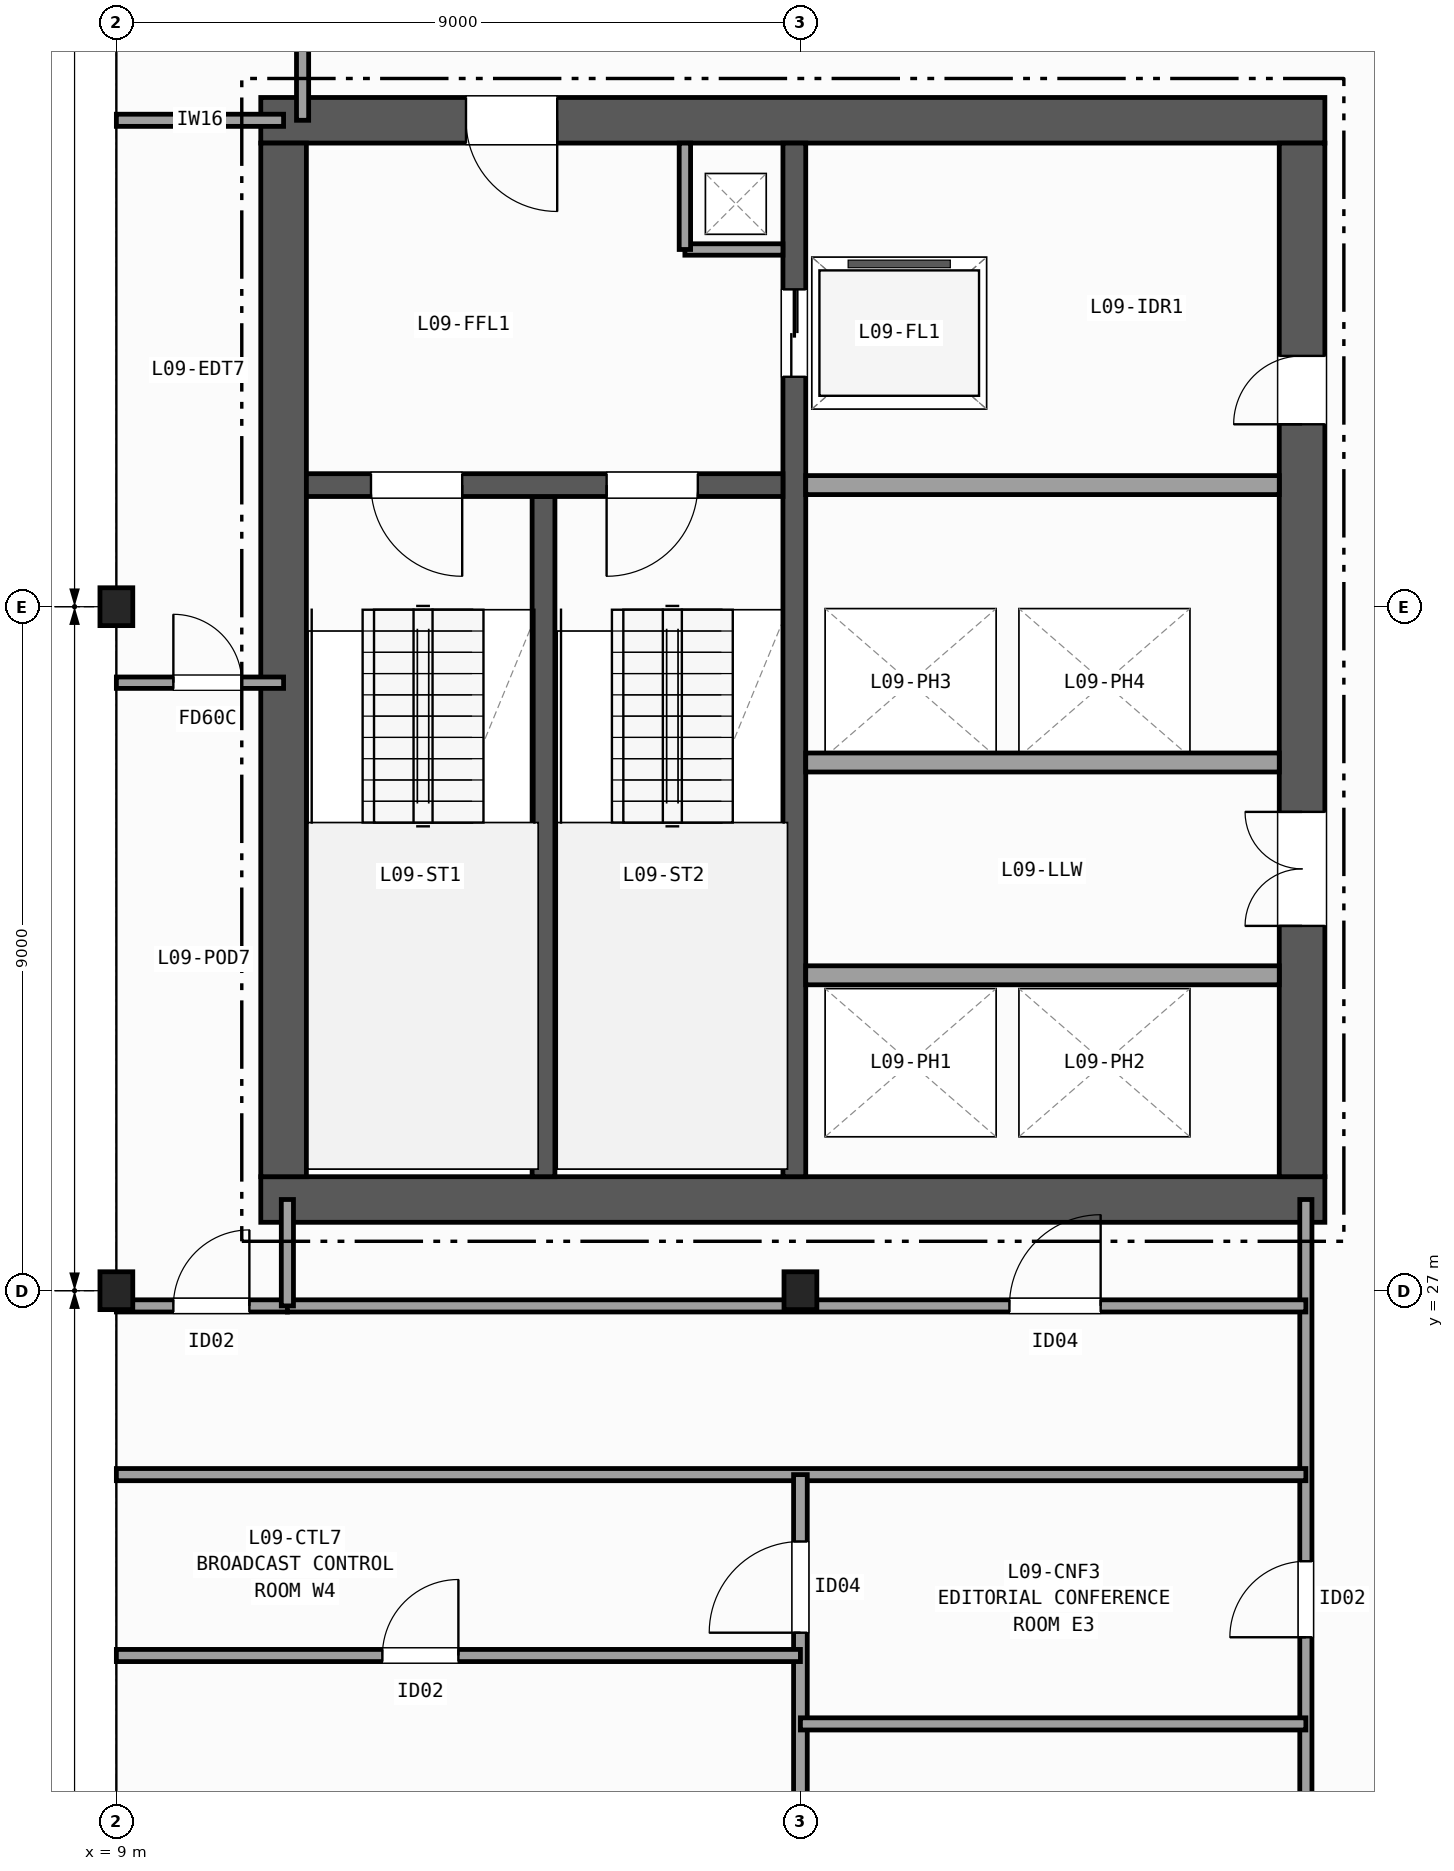
"""IFC4 building model, lengths in metres.
Left out: names, types, materials, properties, quantities, classifications, styles, units other than length and angle.
Written with IfcOpenShell. Run it as: python <this file> out.ifc"""

import sys

from ifc_helpers import new_model, si_unit, direction, frame, frame_2d, origin, origin_2d, place, context, subcontext, project, spatial, rectangle, i_section, extrude, element, fill, save


model = new_model("IFC4")
c1 = context("Model", 3, precision=1e-05, world=origin(), true_north=direction((0.0, 1.0)))
c2 = subcontext(c1, "Body", "Model", "MODEL_VIEW")
j1 = project(units=[si_unit("LENGTHUNIT", "METRE"), si_unit("PLANEANGLEUNIT", "RADIAN")], contexts=[c1])
p1 = place(None, origin())
s1 = spatial("IfcSite", under=j1, at=p1, CompositionType="ELEMENT")
p2 = place(p1, origin())
s2 = spatial("IfcBuilding", under=s1, at=p2, CompositionType="ELEMENT")
p3 = place(p2, frame((0.0, 0.0, 43.4)))
s3 = spatial("IfcBuildingStorey", under=s2, at=p3, CompositionType="ELEMENT", Elevation=43.4)
for number, where, z_axis, x_axis in (
    (1, (9.0, 27.0, 0.0), (0.0, 0.0, 1.0), (1.0, 0.0, 0.0)),
    (2, (9.0, 36.0, 0.0), (0.0, 0.0, 1.0), (1.0, 0.0, 0.0)),
    (3, (18.0, 27.0, 0.0), (0.0, 0.0, 1.0), (1.0, 0.0, 0.0)),
):
    element("IfcColumn", number, at=place(p3, frame(where, z_axis=z_axis, x_axis=x_axis)), inside=s3, PredefinedType="COLUMN", context=c2, shape_type="SweptSolid", body=[
        extrude(i_section(OverallWidth=0.432, OverallDepth=0.498, WebThickness=0.056, FlangeThickness=0.089, FilletRadius=0.015, at=origin_2d()), origin(), (0.0, 0.0, 1.0), 3.7),
    ])
p4 = place(p3, frame((10.9, 28.2, 0.0), z_axis=(0.0, 0.0, 1.0), x_axis=(1.0, 0.0, 0.0)))
e4 = element("IfcWall", 4, at=p4, inside=s3, PredefinedType="SHEAR", context=c2, shape_type="SweptSolid", body=[
    extrude(rectangle(XDim=14.0, YDim=0.6, at=frame_2d((7.0, 0.0))), origin(), (0.0, 0.0, 1.0), 3.42),
])
p5 = place(p3, frame((24.9, 42.4, 0.0), z_axis=(0.0, 0.0, 1.0), x_axis=(-1.0, 0.0, 0.0)))
e5 = element("IfcWall", 5, at=p5, inside=s3, PredefinedType="SHEAR", context=c2, shape_type="SweptSolid", body=[
    extrude(rectangle(XDim=14.0, YDim=0.6, at=frame_2d((7.0, 0.0))), origin(), (0.0, 0.0, 1.0), 3.42),
])
p6 = place(p5, frame((10.1, 0.0, 0.0)))
e6 = element("IfcOpeningElement", 6, at=p6, cuts=e5, PredefinedType="OPENING", context=c2, shape_type="SweptSolid", body=[
    extrude(rectangle(XDim=1.2, YDim=2.15, at=frame_2d((0.6, 1.075))), frame((0.0, 0.31, 0.0), z_axis=(0.0, -1.0, 0.0), x_axis=(1.0, 0.0, 0.0)), (0.0, 0.0, 1.0), 0.62),
])
p7 = place(p3, frame((11.2, 42.1, 0.0), z_axis=(0.0, 0.0, 1.0), x_axis=(0.0, -1.0, 0.0)))
e7 = element("IfcWall", 7, at=p7, inside=s3, PredefinedType="SHEAR", context=c2, shape_type="SweptSolid", body=[
    extrude(rectangle(XDim=13.6, YDim=0.6, at=frame_2d((6.8, 0.0))), origin(), (0.0, 0.0, 1.0), 3.42),
])
p8 = place(p3, frame((24.6, 28.5, 0.0), z_axis=(0.0, 0.0, 1.0), x_axis=(0.0, 1.0, 0.0)))
e8 = element("IfcWall", 8, at=p8, inside=s3, PredefinedType="SHEAR", context=c2, shape_type="SweptSolid", body=[
    extrude(rectangle(XDim=13.6, YDim=0.6, at=frame_2d((6.8, 0.0))), origin(), (0.0, 0.0, 1.0), 3.42),
])
p9 = place(p8, frame((3.3, 0.0, 0.0)))
e9 = element("IfcOpeningElement", 9, at=p9, cuts=e8, PredefinedType="OPENING", context=c2, shape_type="SweptSolid", body=[
    extrude(rectangle(XDim=1.5, YDim=2.2, at=frame_2d((0.75, 1.1))), frame((0.0, 0.31, 0.0), z_axis=(0.0, -1.0, 0.0), x_axis=(1.0, 0.0, 0.0)), (0.0, 0.0, 1.0), 0.62),
])
p10 = place(p8, frame((9.9, 0.0, 0.0)))
e10 = element("IfcOpeningElement", 10, at=p10, cuts=e8, PredefinedType="OPENING", context=c2, shape_type="SweptSolid", body=[
    extrude(rectangle(XDim=0.9, YDim=2.1, at=frame_2d((0.45, 1.05))), frame((0.0, 0.31, 0.0), z_axis=(0.0, -1.0, 0.0), x_axis=(1.0, 0.0, 0.0)), (0.0, 0.0, 1.0), 0.62),
])
p11 = place(p3, frame((14.62, 28.5, 0.0), z_axis=(0.0, 0.0, 1.0), x_axis=(0.0, 1.0, 0.0)))
e11 = element("IfcWall", 11, at=p11, inside=s3, PredefinedType="SHEAR", context=c2, shape_type="SweptSolid", body=[
    extrude(rectangle(XDim=8.95, YDim=0.3, at=frame_2d((4.475, 0.0))), origin(), (0.0, 0.0, 1.0), 3.42),
])
p12 = place(p3, frame((17.92, 42.1, 0.0), z_axis=(0.0, 0.0, 1.0), x_axis=(0.0, -1.0, 0.0)))
e12 = element("IfcWall", 12, at=p12, inside=s3, PredefinedType="SHEAR", context=c2, shape_type="SweptSolid", body=[
    extrude(rectangle(XDim=13.6, YDim=0.3, at=frame_2d((6.8, 0.0))), origin(), (0.0, 0.0, 1.0), 3.42),
])
p13 = place(p12, frame((1.925, 0.0, 0.0)))
e13 = element("IfcOpeningElement", 13, at=p13, cuts=e12, PredefinedType="OPENING", context=c2, shape_type="SweptSolid", body=[
    extrude(rectangle(XDim=1.15, YDim=2.15, at=frame_2d((0.575, 1.075))), frame((0.0, 0.16, 0.0), z_axis=(0.0, -1.0, 0.0), x_axis=(1.0, 0.0, 0.0)), (0.0, 0.0, 1.0), 0.32),
])
p14 = place(p3, frame((17.77, 37.6, 0.0), z_axis=(0.0, 0.0, 1.0), x_axis=(-1.0, 0.0, 0.0)))
e14 = element("IfcWall", 14, at=p14, inside=s3, PredefinedType="SHEAR", context=c2, shape_type="SweptSolid", body=[
    extrude(rectangle(XDim=6.27, YDim=0.3, at=frame_2d((3.135, 0.0))), origin(), (0.0, 0.0, 1.0), 3.42),
])
p15 = place(p14, frame((4.22, 0.0, 0.0)))
e15 = element("IfcOpeningElement", 15, at=p15, cuts=e14, PredefinedType="OPENING", context=c2, shape_type="SweptSolid", body=[
    extrude(rectangle(XDim=1.2, YDim=2.15, at=frame_2d((0.6, 1.075))), frame((0.0, 0.16, 0.0), z_axis=(0.0, -1.0, 0.0), x_axis=(1.0, 0.0, 0.0)), (0.0, 0.0, 1.0), 0.32),
])
p16 = place(p14, frame((1.12, 0.0, 0.0)))
e16 = element("IfcOpeningElement", 16, at=p16, cuts=e14, PredefinedType="OPENING", context=c2, shape_type="SweptSolid", body=[
    extrude(rectangle(XDim=1.2, YDim=2.15, at=frame_2d((0.6, 1.075))), frame((0.0, 0.16, 0.0), z_axis=(0.0, -1.0, 0.0), x_axis=(1.0, 0.0, 0.0)), (0.0, 0.0, 1.0), 0.32),
])
p17 = place(p3, frame((16.48, 40.7, 0.0), z_axis=(0.0, 0.0, 1.0), x_axis=(1.0, 0.0, 0.0)))
e17 = element("IfcWall", 17, at=p17, inside=s3, PredefinedType="PARTITIONING", context=c2, shape_type="SweptSolid", body=[
    extrude(rectangle(XDim=1.29, YDim=0.15, at=frame_2d((0.645, 0.0))), origin(), (0.0, 0.0, 1.0), 3.42),
])
p18 = place(p3, frame((16.48, 40.7, 0.0), z_axis=(0.0, 0.0, 1.0), x_axis=(0.0, 1.0, 0.0)))
e18 = element("IfcWall", 18, at=p18, inside=s3, PredefinedType="PARTITIONING", context=c2, shape_type="SweptSolid", body=[
    extrude(rectangle(XDim=1.4, YDim=0.15, at=frame_2d((0.7, 0.0))), origin(), (0.0, 0.0, 1.0), 3.42),
])
for number, where, z_axis, x_axis in (
    (19, (18.07, 37.6, 0.0), (0.0, 0.0, 1.0), (1.0, 0.0, 0.0)),
    (20, (18.07, 31.15, 0.0), (0.0, 0.0, 1.0), (1.0, 0.0, 0.0)),
    (21, (24.3, 33.95, 0.0), (0.0, 0.0, 1.0), (-1.0, 0.0, 0.0)),
):
    element("IfcWall", number, at=place(p3, frame(where, z_axis=z_axis, x_axis=x_axis)), inside=s3, PredefinedType="PARTITIONING", context=c2, shape_type="SweptSolid", body=[
        extrude(rectangle(XDim=6.23, YDim=0.25, at=frame_2d((3.115, 0.0))), origin(), (0.0, 0.0, 1.0), 3.42),
    ])
p19 = place(p3, frame((9.0, 26.8, 0.0), z_axis=(0.0, 0.0, 1.0), x_axis=(1.0, 0.0, 0.0)))
e22 = element("IfcWall", 22, at=p19, inside=s3, PredefinedType="PARTITIONING", context=c2, shape_type="SweptSolid", body=[
    extrude(rectangle(XDim=2.25, YDim=0.16, at=frame_2d((1.125, 0.0))), origin(), (0.0, 0.0, 1.0), 2.627),
])
p20 = place(p19, frame((0.75, 0.0, 0.0)))
e23 = element("IfcOpeningElement", 23, at=p20, cuts=e22, PredefinedType="OPENING", context=c2, shape_type="SweptSolid", body=[
    extrude(rectangle(XDim=1.0, YDim=2.1, at=frame_2d((0.5, 1.05))), frame((0.0, 0.09, 0.0), z_axis=(0.0, -1.0, 0.0), x_axis=(1.0, 0.0, 0.0)), (0.0, 0.0, 1.0), 0.18),
])
p21 = place(p3, frame((9.0, 42.4, 0.0), z_axis=(0.0, 0.0, 1.0), x_axis=(1.0, 0.0, 0.0)))
e24 = element("IfcWall", 24, at=p21, inside=s3, PredefinedType="PARTITIONING", context=c2, shape_type="SweptSolid", body=[
    extrude(rectangle(XDim=2.2, YDim=0.16, at=frame_2d((1.1, 0.0))), origin(), (0.0, 0.0, 1.0), 2.627),
])
p22 = place(p3, frame((11.45, 42.4, 0.0), z_axis=(0.0, 0.0, 1.0), x_axis=(0.0, 1.0, 0.0)))
e25 = element("IfcWall", 25, at=p22, inside=s3, PredefinedType="PARTITIONING", context=c2, shape_type="SweptSolid", body=[
    extrude(rectangle(XDim=2.1, YDim=0.16, at=frame_2d((1.05, 0.0))), origin(), (0.0, 0.0, 1.0), 3.42),
])
p23 = place(p3, frame((9.0, 35.0, 0.0), z_axis=(0.0, 0.0, 1.0), x_axis=(1.0, 0.0, 0.0)))
e26 = element("IfcWall", 26, at=p23, inside=s3, PredefinedType="PARTITIONING", context=c2, shape_type="SweptSolid", body=[
    extrude(rectangle(XDim=2.2, YDim=0.15, at=frame_2d((1.1, 0.0))), origin(), (0.0, 0.0, 1.0), 2.627),
])
p24 = place(p23, frame((0.75, 0.0, 0.0)))
e27 = element("IfcOpeningElement", 27, at=p24, cuts=e26, PredefinedType="OPENING", context=c2, shape_type="SweptSolid", body=[
    extrude(rectangle(XDim=0.9, YDim=2.1, at=frame_2d((0.45, 1.05))), frame((0.0, 0.085, 0.0), z_axis=(0.0, -1.0, 0.0), x_axis=(1.0, 0.0, 0.0)), (0.0, 0.0, 1.0), 0.17),
])
p25 = place(p3, frame((24.65, 9.0, 0.0), z_axis=(0.0, 0.0, 1.0), x_axis=(0.0, 1.0, 0.0)))
e28 = element("IfcWall", 28, at=p25, inside=s3, PredefinedType="PARTITIONING", context=c2, shape_type="SweptSolid", body=[
    extrude(rectangle(XDim=19.2, YDim=0.16, at=frame_2d((9.6, 0.0))), origin(), (0.0, 0.0, 1.0), 2.627),
])
p26 = place(p25, frame((2.55, 0.0, 0.0)))
e29 = element("IfcOpeningElement", 29, at=p26, cuts=e28, PredefinedType="OPENING", context=c2, shape_type="SweptSolid", body=[
    extrude(rectangle(XDim=0.86, YDim=2.05, at=frame_2d((0.43, 1.025))), frame((0.0, 0.09, 0.0), z_axis=(0.0, -1.0, 0.0), x_axis=(1.0, 0.0, 0.0)), (0.0, 0.0, 1.0), 0.18),
])
p27 = place(p25, frame((8.55, 0.0, 0.0)))
e30 = element("IfcOpeningElement", 30, at=p27, cuts=e28, PredefinedType="OPENING", context=c2, shape_type="SweptSolid", body=[
    extrude(rectangle(XDim=0.95, YDim=2.1, at=frame_2d((0.475, 1.05))), frame((0.0, 0.09, 0.0), z_axis=(0.0, -1.0, 0.0), x_axis=(1.0, 0.0, 0.0)), (0.0, 0.0, 1.0), 0.18),
])
p28 = place(p25, frame((13.44, 0.0, 0.0)))
e31 = element("IfcOpeningElement", 31, at=p28, cuts=e28, PredefinedType="OPENING", context=c2, shape_type="SweptSolid", body=[
    extrude(rectangle(XDim=1.0, YDim=2.1, at=frame_2d((0.5, 1.05))), frame((0.0, 0.09, 0.0), z_axis=(0.0, -1.0, 0.0), x_axis=(1.0, 0.0, 0.0)), (0.0, 0.0, 1.0), 0.18),
])
p29 = place(p3, frame((9.0, 24.58, 0.0), z_axis=(0.0, 0.0, 1.0), x_axis=(1.0, 0.0, 0.0)))
e32 = element("IfcWall", 32, at=p29, inside=s3, PredefinedType="PARTITIONING", context=c2, shape_type="SweptSolid", body=[
    extrude(rectangle(XDim=15.65, YDim=0.16, at=frame_2d((7.825, 0.0))), origin(), (0.0, 0.0, 1.0), 2.627),
])
p30 = place(p3, frame((11.25, 26.8, 0.0), z_axis=(0.0, 0.0, 1.0), x_axis=(1.0, 0.0, 0.0)))
e33 = element("IfcWall", 33, at=p30, inside=s3, PredefinedType="PARTITIONING", context=c2, shape_type="SweptSolid", body=[
    extrude(rectangle(XDim=13.4, YDim=0.16, at=frame_2d((6.7, 0.0))), origin(), (0.0, 0.0, 1.0), 2.789),
])
p31 = place(p30, frame((9.5, 0.0, 0.0)))
e34 = element("IfcOpeningElement", 34, at=p31, cuts=e33, PredefinedType="OPENING", context=c2, shape_type="SweptSolid", body=[
    extrude(rectangle(XDim=1.2, YDim=2.15, at=frame_2d((0.6, 1.075))), frame((0.0, 0.09, 0.0), z_axis=(0.0, -1.0, 0.0), x_axis=(1.0, 0.0, 0.0)), (0.0, 0.0, 1.0), 0.18),
])
p32 = place(p3, frame((11.25, 26.8, 0.0), z_axis=(0.0, 0.0, 1.0), x_axis=(0.0, 1.0, 0.0)))
e35 = element("IfcWall", 35, at=p32, inside=s3, PredefinedType="PARTITIONING", context=c2, shape_type="SweptSolid", body=[
    extrude(rectangle(XDim=1.4, YDim=0.16, at=frame_2d((0.7, 0.0))), origin(), (0.0, 0.0, 1.0), 2.789),
])
p33 = place(p3, frame((18.0, 9.0, 0.0), z_axis=(0.0, 0.0, 1.0), x_axis=(0.0, 1.0, 0.0)))
e36 = element("IfcWall", 36, at=p33, inside=s3, PredefinedType="PARTITIONING", context=c2, shape_type="SweptSolid", body=[
    extrude(rectangle(XDim=15.58, YDim=0.18, at=frame_2d((7.79, 0.0))), origin(), (0.0, 0.0, 1.0), 2.627),
])
p34 = place(p33, frame((2.2, 0.0, 0.0)))
e37 = element("IfcOpeningElement", 37, at=p34, cuts=e36, PredefinedType="OPENING", context=c2, shape_type="SweptSolid", body=[
    extrude(rectangle(XDim=1.05, YDim=2.15, at=frame_2d((0.525, 1.075))), frame((0.0, 0.1, 0.0), z_axis=(0.0, -1.0, 0.0), x_axis=(1.0, 0.0, 0.0)), (0.0, 0.0, 1.0), 0.2),
])
p35 = place(p33, frame((13.5, 0.0, 0.0)))
e38 = element("IfcOpeningElement", 38, at=p35, cuts=e36, PredefinedType="OPENING", context=c2, shape_type="SweptSolid", body=[
    extrude(rectangle(XDim=1.2, YDim=2.15, at=frame_2d((0.6, 1.075))), frame((0.0, 0.1, 0.0), z_axis=(0.0, -1.0, 0.0), x_axis=(1.0, 0.0, 0.0)), (0.0, 0.0, 1.0), 0.2),
])
p36 = place(p3, frame((18.0, 21.3, 0.0), z_axis=(0.0, 0.0, 1.0), x_axis=(1.0, 0.0, 0.0)))
e39 = element("IfcWall", 39, at=p36, inside=s3, PredefinedType="PARTITIONING", context=c2, shape_type="SweptSolid", body=[
    extrude(rectangle(XDim=6.65, YDim=0.16, at=frame_2d((3.325, 0.0))), origin(), (0.0, 0.0, 1.0), 2.792),
])
p37 = place(p3, frame((9.0, 22.2, 0.0), z_axis=(0.0, 0.0, 1.0), x_axis=(1.0, 0.0, 0.0)))
e40 = element("IfcWall", 40, at=p37, inside=s3, PredefinedType="PARTITIONING", context=c2, shape_type="SweptSolid", body=[
    extrude(rectangle(XDim=9.0, YDim=0.16, at=frame_2d((4.5, 0.0))), origin(), (0.0, 0.0, 1.0), 2.627),
])
p38 = place(p37, frame((3.5, 0.0, 0.0)))
e41 = element("IfcOpeningElement", 41, at=p38, cuts=e40, PredefinedType="OPENING", context=c2, shape_type="SweptSolid", body=[
    extrude(rectangle(XDim=1.0, YDim=2.1, at=frame_2d((0.5, 1.05))), frame((0.0, 0.09, 0.0), z_axis=(0.0, -1.0, 0.0), x_axis=(1.0, 0.0, 0.0)), (0.0, 0.0, 1.0), 0.18),
])
p39 = place(p15, origin())
e42 = element("IfcDoor", 42, at=p39, inside=s3, OperationType="SINGLE_SWING_LEFT", PredefinedType="DOOR", context=c2, shape_type="SweptSolid", body=[
    extrude(rectangle(XDim=1.2, YDim=2.15, at=frame_2d((0.6, 1.075))), frame((0.0, 0.025, 0.0), z_axis=(0.0, -1.0, 0.0), x_axis=(1.0, 0.0, 0.0)), (0.0, 0.0, 1.0), 0.05),
])
fill(e15, e42)
p40 = place(p16, origin())
e43 = element("IfcDoor", 43, at=p40, inside=s3, OperationType="SINGLE_SWING_RIGHT", PredefinedType="DOOR", context=c2, shape_type="SweptSolid", body=[
    extrude(rectangle(XDim=1.2, YDim=2.15, at=frame_2d((0.6, 1.075))), frame((0.0, 0.025, 0.0), z_axis=(0.0, -1.0, 0.0), x_axis=(1.0, 0.0, 0.0)), (0.0, 0.0, 1.0), 0.05),
])
fill(e16, e43)
p41 = place(p9, origin())
e44 = element("IfcDoor", 44, at=p41, inside=s3, OperationType="DOUBLE_DOOR_SINGLE_SWING", PredefinedType="DOOR", context=c2, shape_type="SweptSolid", body=[
    extrude(rectangle(XDim=1.5, YDim=2.2, at=frame_2d((0.75, 1.1))), frame((0.0, 0.025, 0.0), z_axis=(0.0, -1.0, 0.0), x_axis=(1.0, 0.0, 0.0)), (0.0, 0.0, 1.0), 0.05),
])
fill(e9, e44)
p42 = place(p6, origin())
e45 = element("IfcDoor", 45, at=p42, inside=s3, OperationType="SINGLE_SWING_LEFT", PredefinedType="DOOR", context=c2, shape_type="SweptSolid", body=[
    extrude(rectangle(XDim=1.2, YDim=2.15, at=frame_2d((0.6, 1.075))), frame((0.0, 0.025, 0.0), z_axis=(0.0, -1.0, 0.0), x_axis=(1.0, 0.0, 0.0)), (0.0, 0.0, 1.0), 0.05),
])
fill(e6, e45)
p43 = place(p10, origin())
e46 = element("IfcDoor", 46, at=p43, inside=s3, OperationType="SINGLE_SWING_LEFT", PredefinedType="DOOR", context=c2, shape_type="SweptSolid", body=[
    extrude(rectangle(XDim=0.9, YDim=2.1, at=frame_2d((0.45, 1.05))), frame((0.0, 0.025, 0.0), z_axis=(0.0, -1.0, 0.0), x_axis=(1.0, 0.0, 0.0)), (0.0, 0.0, 1.0), 0.05),
])
fill(e10, e46)
p44 = place(p13, origin())
e47 = element("IfcDoor", 47, at=p44, inside=s3, OperationType="DOUBLE_DOOR_SLIDING", PredefinedType="DOOR", context=c2, shape_type="SweptSolid", body=[
    extrude(rectangle(XDim=1.15, YDim=2.15, at=frame_2d((0.575, 1.075))), frame((0.0, 0.025, 0.0), z_axis=(0.0, -1.0, 0.0), x_axis=(1.0, 0.0, 0.0)), (0.0, 0.0, 1.0), 0.05),
])
fill(e13, e47)
p45 = place(p20, origin())
e48 = element("IfcDoor", 48, at=p45, inside=s3, OperationType="SINGLE_SWING_RIGHT", PredefinedType="DOOR", context=c2, shape_type="SweptSolid", body=[
    extrude(rectangle(XDim=1.0, YDim=2.1, at=frame_2d((0.5, 1.05))), frame((0.0, 0.025, 0.0), z_axis=(0.0, -1.0, 0.0), x_axis=(1.0, 0.0, 0.0)), (0.0, 0.0, 1.0), 0.05),
])
fill(e23, e48)
p46 = place(p24, origin())
e49 = element("IfcDoor", 49, at=p46, inside=s3, OperationType="SINGLE_SWING_LEFT", PredefinedType="DOOR", context=c2, shape_type="SweptSolid", body=[
    extrude(rectangle(XDim=0.9, YDim=2.1, at=frame_2d((0.45, 1.05))), frame((0.0, 0.025, 0.0), z_axis=(0.0, -1.0, 0.0), x_axis=(1.0, 0.0, 0.0)), (0.0, 0.0, 1.0), 0.05),
])
fill(e27, e49)
p47 = place(p31, origin())
e50 = element("IfcDoor", 50, at=p47, inside=s3, OperationType="SINGLE_SWING_RIGHT", PredefinedType="DOOR", context=c2, shape_type="SweptSolid", body=[
    extrude(rectangle(XDim=1.2, YDim=2.15, at=frame_2d((0.6, 1.075))), frame((0.0, 0.025, 0.0), z_axis=(0.0, -1.0, 0.0), x_axis=(1.0, 0.0, 0.0)), (0.0, 0.0, 1.0), 0.05),
])
fill(e34, e50)
p48 = place(p28, origin())
e51 = element("IfcDoor", 51, at=p48, inside=s3, OperationType="SINGLE_SWING_LEFT", PredefinedType="DOOR", context=c2, shape_type="SweptSolid", body=[
    extrude(rectangle(XDim=1.0, YDim=2.1, at=frame_2d((0.5, 1.05))), frame((0.0, 0.025, 0.0), z_axis=(0.0, -1.0, 0.0), x_axis=(1.0, 0.0, 0.0)), (0.0, 0.0, 1.0), 0.05),
])
fill(e31, e51)
p49 = place(p35, origin())
e52 = element("IfcDoor", 52, at=p49, inside=s3, OperationType="SINGLE_SWING_LEFT", PredefinedType="DOOR", context=c2, shape_type="SweptSolid", body=[
    extrude(rectangle(XDim=1.2, YDim=2.15, at=frame_2d((0.6, 1.075))), frame((0.0, 0.025, 0.0), z_axis=(0.0, -1.0, 0.0), x_axis=(1.0, 0.0, 0.0)), (0.0, 0.0, 1.0), 0.05),
])
fill(e38, e52)
p50 = place(p38, origin())
e53 = element("IfcDoor", 53, at=p50, inside=s3, OperationType="SINGLE_SWING_RIGHT", PredefinedType="DOOR", context=c2, shape_type="SweptSolid", body=[
    extrude(rectangle(XDim=1.0, YDim=2.1, at=frame_2d((0.5, 1.05))), frame((0.0, 0.025, 0.0), z_axis=(0.0, -1.0, 0.0), x_axis=(1.0, 0.0, 0.0)), (0.0, 0.0, 1.0), 0.05),
])
fill(e41, e53)
save(model, sys.argv[1])
